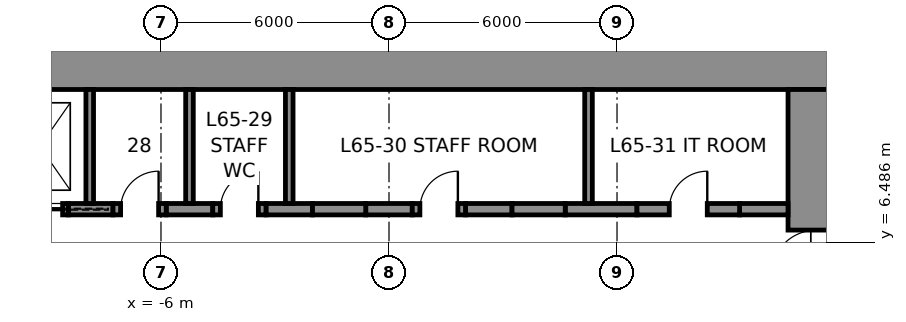
"""IFC4 building model, lengths in metres.
Left out: names, types, materials, properties, quantities, classifications, styles, units other than length and angle.
Written with IfcOpenShell. Run it as: python <this file> out.ifc"""

import sys

from ifc_helpers import new_model, si_unit, direction, frame, frame_2d, origin, place, context, subcontext, project, spatial, rectangle, extrude, element, fill, save


model = new_model("IFC4")
c1 = context("Model", 3, precision=1e-05, world=origin(), true_north=direction((0.0, 1.0)))
c2 = subcontext(c1, "Body", "Model", "MODEL_VIEW")
j1 = project(units=[si_unit("LENGTHUNIT", "METRE"), si_unit("PLANEANGLEUNIT", "RADIAN")], contexts=[c1])
p1 = place(None, origin())
s1 = spatial("IfcSite", under=j1, at=p1, CompositionType="ELEMENT")
p2 = place(p1, origin())
s2 = spatial("IfcBuilding", under=s1, at=p2, CompositionType="ELEMENT")
p3 = place(p2, frame((0.0, 0.0, 289.8)))
s3 = spatial("IfcBuildingStorey", under=s2, at=p3, CompositionType="ELEMENT", Elevation=289.8)
p4 = place(p3, frame((-12.0, 11.25, 0.0), z_axis=(0.0, 0.0, 1.0), x_axis=(1.0, 0.0, 0.0)))
e1 = element("IfcWall", 1, at=p4, inside=s3, PredefinedType="SHEAR", context=c2, shape_type="SweptSolid", body=[
    extrude(rectangle(XDim=24.0, YDim=1.5, at=frame_2d((12.0, 0.0))), origin(), (0.0, 0.0, 1.0), 4.0),
])
p5 = place(p3, frame((11.25, 10.5, 0.0), z_axis=(0.0, 0.0, 1.0), x_axis=(0.0, -1.0, 0.0)))
e2 = element("IfcWall", 2, at=p5, inside=s3, PredefinedType="SHEAR", context=c2, shape_type="SweptSolid", body=[
    extrude(rectangle(XDim=21.0, YDim=1.5, at=frame_2d((10.5, 0.0))), origin(), (0.0, 0.0, 1.0), 4.0),
])
p6 = place(p5, frame((3.7, 0.0, 0.0)))
e3 = element("IfcOpeningElement", 3, at=p6, cuts=e2, PredefinedType="OPENING", context=c2, shape_type="SweptSolid", body=[
    extrude(rectangle(XDim=1.2, YDim=2.3, at=frame_2d((0.6, 1.15))), frame((0.0, 0.76, 0.0), z_axis=(0.0, -1.0, 0.0), x_axis=(1.0, 0.0, 0.0)), (0.0, 0.0, 1.0), 1.52),
])
p7 = place(p5, frame((16.1, 0.0, 0.0)))
e4 = element("IfcOpeningElement", 4, at=p7, cuts=e2, PredefinedType="OPENING", context=c2, shape_type="SweptSolid", body=[
    extrude(rectangle(XDim=1.2, YDim=2.3, at=frame_2d((0.6, 1.15))), frame((0.0, 0.76, 0.0), z_axis=(0.0, -1.0, 0.0), x_axis=(1.0, 0.0, 0.0)), (0.0, 0.0, 1.0), 1.52),
])
p8 = place(p3, frame((-8.438, 7.35, 0.0), z_axis=(0.0, 0.0, 1.0), x_axis=(1.0, 0.0, 0.0)))
e5 = element("IfcWall", 5, at=p8, inside=s3, PredefinedType="SHEAR", context=c2, shape_type="SweptSolid", body=[
    extrude(rectangle(XDim=1.175, YDim=0.3, at=frame_2d((0.587, 0.0))), origin(), (0.0, 0.0, 1.0), 4.0),
])
for number, where, z_axis, x_axis in (
    (6, (-5.863, 7.35, 0.0), (0.0, 0.0, 1.0), (1.0, 0.0, 0.0)),
    (7, (-3.238, 7.35, 0.0), (0.0, 0.0, 1.0), (1.0, 0.0, 0.0)),
    (8, (-0.613, 7.35, 0.0), (0.0, 0.0, 1.0), (1.0, 0.0, 0.0)),
    (9, (2.012, 7.35, 0.0), (0.0, 0.0, 1.0), (1.0, 0.0, 0.0)),
):
    element("IfcWall", number, at=place(p3, frame(where, z_axis=z_axis, x_axis=x_axis)), inside=s3, PredefinedType="SHEAR", context=c2, shape_type="SweptSolid", body=[
        extrude(rectangle(XDim=1.225, YDim=0.3, at=frame_2d((0.613, 0.0))), origin(), (0.0, 0.0, 1.0), 4.0),
    ])
p9 = place(p3, frame((4.637, 7.35, 0.0), z_axis=(0.0, 0.0, 1.0), x_axis=(1.0, 0.0, 0.0)))
e10 = element("IfcWall", 10, at=p9, inside=s3, PredefinedType="SHEAR", context=c2, shape_type="SweptSolid", body=[
    extrude(rectangle(XDim=1.887, YDim=0.3, at=frame_2d((0.944, 0.0))), origin(), (0.0, 0.0, 1.0), 4.0),
])
p10 = place(p3, frame((9.225, 7.35, 0.0), z_axis=(0.0, 0.0, 1.0), x_axis=(1.0, 0.0, 0.0)))
e11 = element("IfcWall", 11, at=p10, inside=s3, PredefinedType="SHEAR", context=c2, shape_type="SweptSolid", body=[
    extrude(rectangle(XDim=1.275, YDim=0.3, at=frame_2d((0.637, 0.0))), origin(), (0.0, 0.0, 1.0), 4.0),
])
p11 = place(p3, frame((-9.938, 7.35, 0.0), z_axis=(0.0, 0.0, 1.0), x_axis=(1.0, 0.0, 0.0)))
e12 = element("IfcWall", 12, at=p11, inside=s3, PredefinedType="PARTITIONING", context=c2, shape_type="SweptSolid", body=[
    extrude(rectangle(XDim=1.5, YDim=0.3, at=frame_2d((0.75, 0.0))), origin(), (0.0, 0.0, 1.0), 4.0),
])
p12 = place(p11, frame((0.15, 0.0, 0.0)))
e13 = element("IfcOpeningElement", 13, at=p12, cuts=e12, PredefinedType="OPENING", context=c2, shape_type="SweptSolid", body=[
    extrude(rectangle(XDim=1.2, YDim=2.3, at=frame_2d((0.6, 1.15))), frame((0.0, 0.16, 0.0), z_axis=(0.0, -1.0, 0.0), x_axis=(1.0, 0.0, 0.0)), (0.0, 0.0, 1.0), 0.32),
])
p13 = place(p3, frame((-7.262, 7.35, 0.0), z_axis=(0.0, 0.0, 1.0), x_axis=(1.0, 0.0, 0.0)))
e14 = element("IfcWall", 14, at=p13, inside=s3, PredefinedType="PARTITIONING", context=c2, shape_type="SweptSolid", body=[
    extrude(rectangle(XDim=1.4, YDim=0.3, at=frame_2d((0.7, 0.0))), origin(), (0.0, 0.0, 1.0), 4.0),
])
p14 = place(p13, frame((0.2, 0.0, 0.0)))
e15 = element("IfcOpeningElement", 15, at=p14, cuts=e14, PredefinedType="OPENING", context=c2, shape_type="SweptSolid", body=[
    extrude(rectangle(XDim=1.0, YDim=2.3, at=frame_2d((0.5, 1.15))), frame((0.0, 0.16, 0.0), z_axis=(0.0, -1.0, 0.0), x_axis=(1.0, 0.0, 0.0)), (0.0, 0.0, 1.0), 0.32),
])
p15 = place(p3, frame((-4.637, 7.35, 0.0), z_axis=(0.0, 0.0, 1.0), x_axis=(1.0, 0.0, 0.0)))
e16 = element("IfcWall", 16, at=p15, inside=s3, PredefinedType="PARTITIONING", context=c2, shape_type="SweptSolid", body=[
    extrude(rectangle(XDim=1.4, YDim=0.3, at=frame_2d((0.7, 0.0))), origin(), (0.0, 0.0, 1.0), 4.0),
])
p16 = place(p15, frame((0.2, 0.0, 0.0)))
e17 = element("IfcOpeningElement", 17, at=p16, cuts=e16, PredefinedType="OPENING", context=c2, shape_type="SweptSolid", body=[
    extrude(rectangle(XDim=1.0, YDim=2.3, at=frame_2d((0.5, 1.15))), frame((0.0, 0.16, 0.0), z_axis=(0.0, -1.0, 0.0), x_axis=(1.0, 0.0, 0.0)), (0.0, 0.0, 1.0), 0.32),
])
p17 = place(p3, frame((-2.012, 7.35, 0.0), z_axis=(0.0, 0.0, 1.0), x_axis=(1.0, 0.0, 0.0)))
e18 = element("IfcWall", 18, at=p17, inside=s3, PredefinedType="PARTITIONING", context=c2, shape_type="SweptSolid", body=[
    extrude(rectangle(XDim=1.4, YDim=0.3, at=frame_2d((0.7, 0.0))), origin(), (0.0, 0.0, 1.0), 4.0),
])
p18 = place(p3, frame((0.613, 7.35, 0.0), z_axis=(0.0, 0.0, 1.0), x_axis=(1.0, 0.0, 0.0)))
e19 = element("IfcWall", 19, at=p18, inside=s3, PredefinedType="PARTITIONING", context=c2, shape_type="SweptSolid", body=[
    extrude(rectangle(XDim=1.4, YDim=0.3, at=frame_2d((0.7, 0.0))), origin(), (0.0, 0.0, 1.0), 4.0),
])
p19 = place(p18, frame((0.2, 0.0, 0.0)))
e20 = element("IfcOpeningElement", 20, at=p19, cuts=e19, PredefinedType="OPENING", context=c2, shape_type="SweptSolid", body=[
    extrude(rectangle(XDim=1.0, YDim=2.3, at=frame_2d((0.5, 1.15))), frame((0.0, 0.16, 0.0), z_axis=(0.0, -1.0, 0.0), x_axis=(1.0, 0.0, 0.0)), (0.0, 0.0, 1.0), 0.32),
])
p20 = place(p3, frame((3.238, 7.35, 0.0), z_axis=(0.0, 0.0, 1.0), x_axis=(1.0, 0.0, 0.0)))
e21 = element("IfcWall", 21, at=p20, inside=s3, PredefinedType="PARTITIONING", context=c2, shape_type="SweptSolid", body=[
    extrude(rectangle(XDim=1.4, YDim=0.3, at=frame_2d((0.7, 0.0))), origin(), (0.0, 0.0, 1.0), 4.0),
])
p21 = place(p3, frame((6.525, 7.35, 0.0), z_axis=(0.0, 0.0, 1.0), x_axis=(1.0, 0.0, 0.0)))
e22 = element("IfcWall", 22, at=p21, inside=s3, PredefinedType="PARTITIONING", context=c2, shape_type="SweptSolid", body=[
    extrude(rectangle(XDim=2.7, YDim=0.3, at=frame_2d((1.35, 0.0))), origin(), (0.0, 0.0, 1.0), 4.0),
])
p22 = place(p21, frame((0.85, 0.0, 0.0)))
e23 = element("IfcOpeningElement", 23, at=p22, cuts=e22, PredefinedType="OPENING", context=c2, shape_type="SweptSolid", body=[
    extrude(rectangle(XDim=1.0, YDim=2.3, at=frame_2d((0.5, 1.15))), frame((0.0, 0.16, 0.0), z_axis=(0.0, -1.0, 0.0), x_axis=(1.0, 0.0, 0.0)), (0.0, 0.0, 1.0), 0.32),
])
for number, where, z_axis, x_axis in (
    (24, (-7.875, 7.5, 0.0), (0.0, 0.0, 1.0), (0.0, 1.0, 0.0)),
    (25, (-5.25, 7.5, 0.0), (0.0, 0.0, 1.0), (0.0, 1.0, 0.0)),
    (26, (-2.625, 7.5, 0.0), (0.0, 0.0, 1.0), (0.0, 1.0, 0.0)),
    (27, (5.25, 7.5, 0.0), (0.0, 0.0, 1.0), (0.0, 1.0, 0.0)),
):
    element("IfcWall", number, at=place(p3, frame(where, z_axis=z_axis, x_axis=x_axis)), inside=s3, PredefinedType="PARTITIONING", context=c2, shape_type="SweptSolid", body=[
        extrude(rectangle(XDim=3.0, YDim=0.2, at=frame_2d((1.5, 0.0))), origin(), (0.0, 0.0, 1.0), 4.0),
    ])
p23 = place(p14, origin())
e28 = element("IfcDoor", 28, at=p23, inside=s3, OperationType="SINGLE_SWING_RIGHT", PredefinedType="DOOR", context=c2, shape_type="SweptSolid", body=[
    extrude(rectangle(XDim=1.0, YDim=2.3, at=frame_2d((0.5, 1.15))), frame((0.0, 0.025, 0.0), z_axis=(0.0, -1.0, 0.0), x_axis=(1.0, 0.0, 0.0)), (0.0, 0.0, 1.0), 0.05),
])
fill(e15, e28)
p24 = place(p16, origin())
e29 = element("IfcDoor", 29, at=p24, inside=s3, OperationType="SINGLE_SWING_RIGHT", PredefinedType="DOOR", context=c2, shape_type="SweptSolid", body=[
    extrude(rectangle(XDim=1.0, YDim=2.3, at=frame_2d((0.5, 1.15))), frame((0.0, 0.025, 0.0), z_axis=(0.0, -1.0, 0.0), x_axis=(1.0, 0.0, 0.0)), (0.0, 0.0, 1.0), 0.05),
])
fill(e17, e29)
p25 = place(p19, origin())
e30 = element("IfcDoor", 30, at=p25, inside=s3, OperationType="SINGLE_SWING_RIGHT", PredefinedType="DOOR", context=c2, shape_type="SweptSolid", body=[
    extrude(rectangle(XDim=1.0, YDim=2.3, at=frame_2d((0.5, 1.15))), frame((0.0, 0.025, 0.0), z_axis=(0.0, -1.0, 0.0), x_axis=(1.0, 0.0, 0.0)), (0.0, 0.0, 1.0), 0.05),
])
fill(e20, e30)
p26 = place(p22, origin())
e31 = element("IfcDoor", 31, at=p26, inside=s3, OperationType="SINGLE_SWING_RIGHT", PredefinedType="DOOR", context=c2, shape_type="SweptSolid", body=[
    extrude(rectangle(XDim=1.0, YDim=2.3, at=frame_2d((0.5, 1.15))), frame((0.0, 0.025, 0.0), z_axis=(0.0, -1.0, 0.0), x_axis=(1.0, 0.0, 0.0)), (0.0, 0.0, 1.0), 0.05),
])
fill(e23, e31)
p27 = place(p6, frame((1.2, 0.0, 0.0), z_axis=(0.0, 0.0, 1.0), x_axis=(-1.0, 0.0, 0.0)))
e32 = element("IfcDoor", 32, at=p27, inside=s3, OperationType="SINGLE_SWING_LEFT", PredefinedType="DOOR", context=c2, shape_type="SweptSolid", body=[
    extrude(rectangle(XDim=1.2, YDim=2.3, at=frame_2d((0.6, 1.15))), frame((0.0, 0.025, 0.0), z_axis=(0.0, -1.0, 0.0), x_axis=(1.0, 0.0, 0.0)), (0.0, 0.0, 1.0), 0.05),
])
fill(e3, e32)
p28 = place(p12, frame((1.2, 0.0, 0.0), z_axis=(0.0, 0.0, 1.0), x_axis=(-1.0, 0.0, 0.0)))
e33 = element("IfcDoor", 33, at=p28, inside=s3, OperationType="SLIDING_TO_LEFT", PredefinedType="DOOR", context=c2, shape_type="SweptSolid", body=[
    extrude(rectangle(XDim=1.2, YDim=2.3, at=frame_2d((0.6, 1.15))), frame((0.0, 0.025, 0.0), z_axis=(0.0, -1.0, 0.0), x_axis=(1.0, 0.0, 0.0)), (0.0, 0.0, 1.0), 0.05),
])
fill(e13, e33)
save(model, sys.argv[1])
